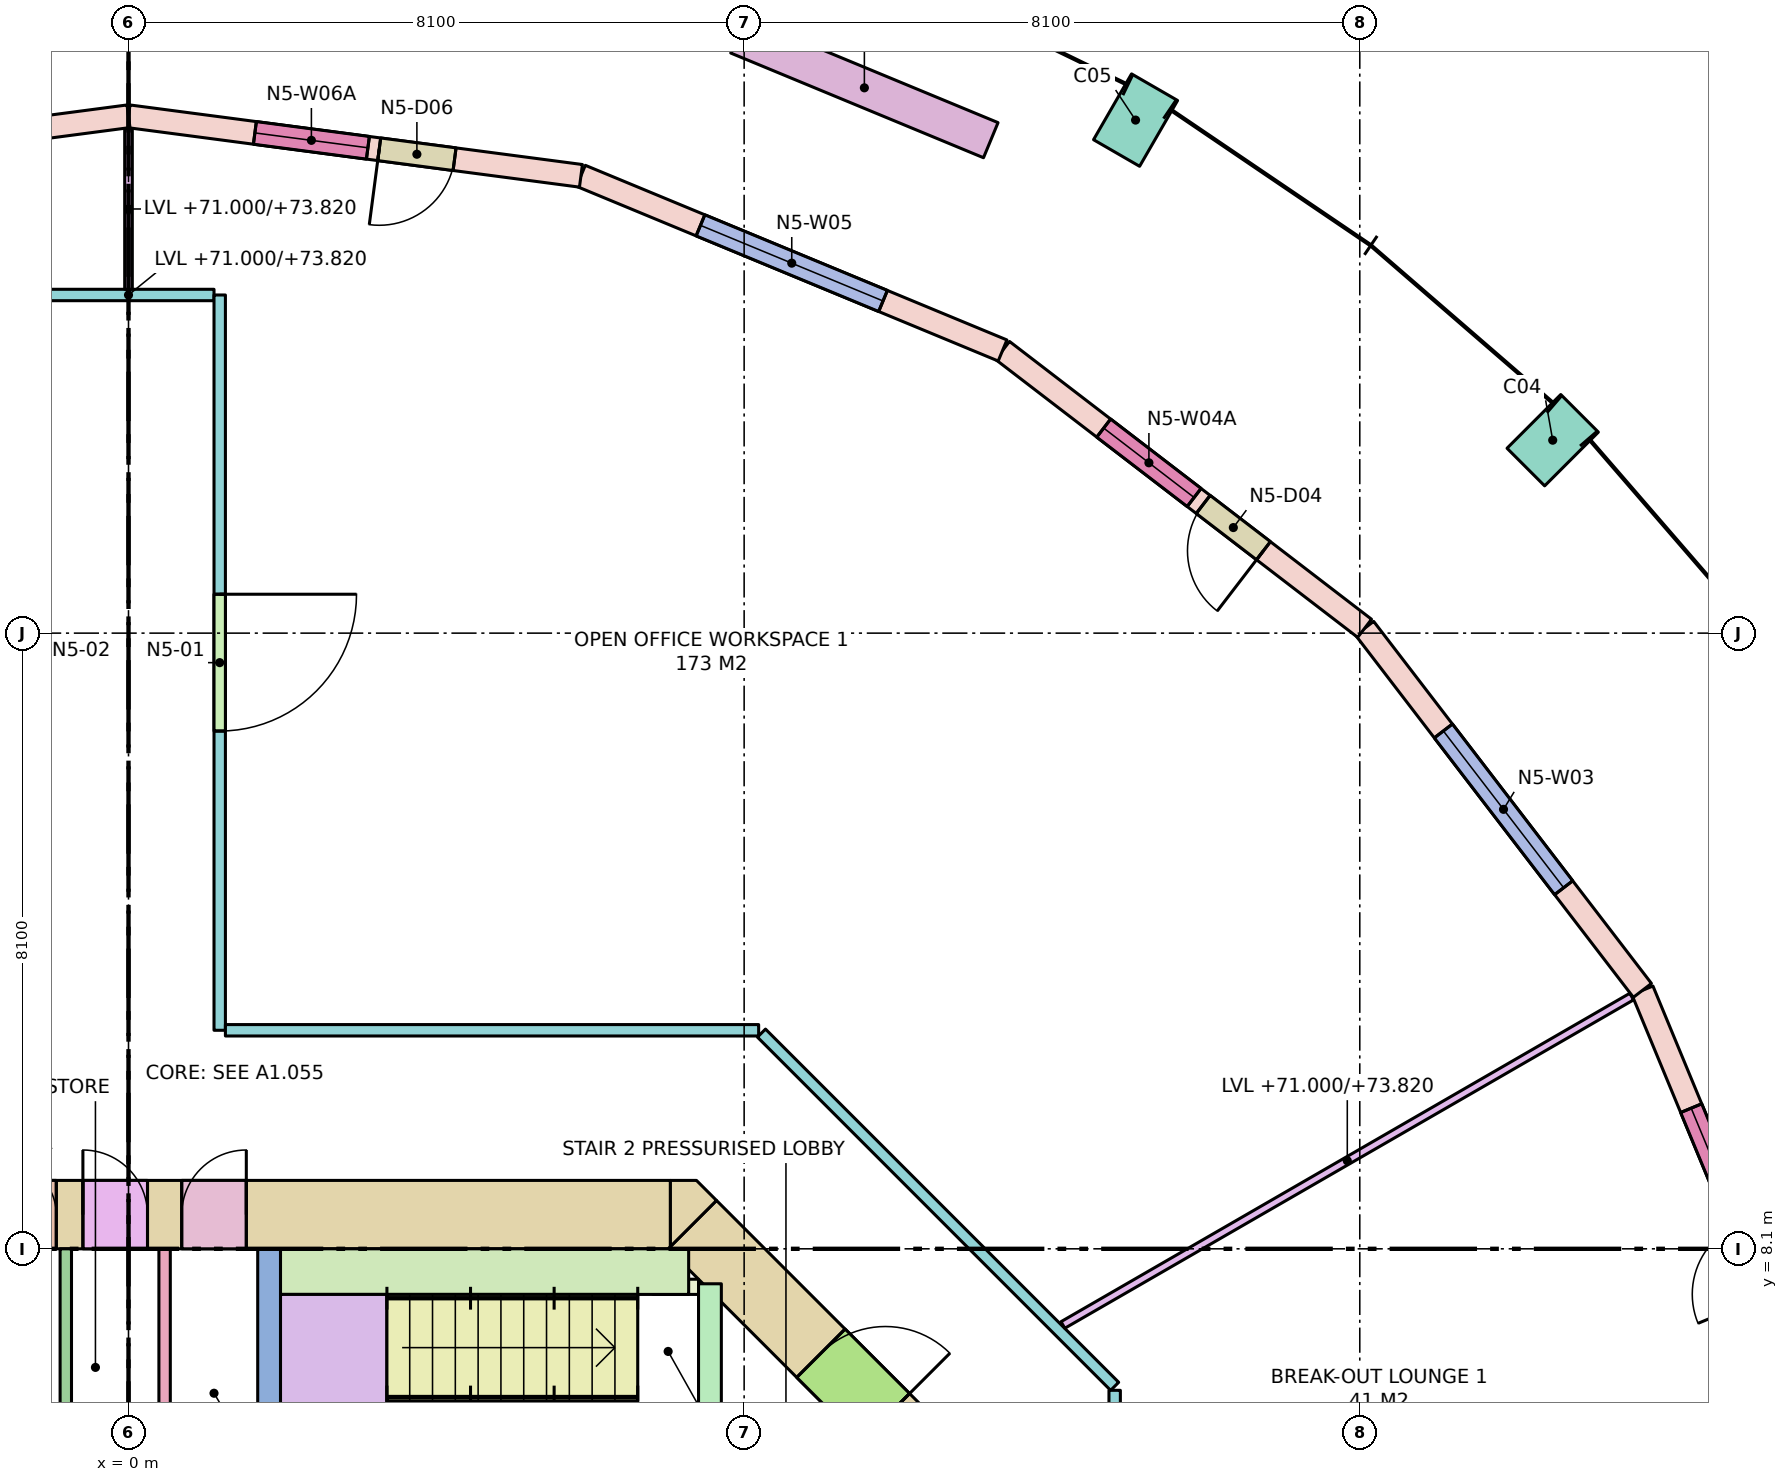
"""IFC4 building model, lengths in metres.
Left out: names, types, materials, properties, quantities, classifications, styles, units other than length and angle.
Written with IfcOpenShell. Run it as: python <this file> out.ifc"""

import sys

from ifc_helpers import new_model, si_unit, direction, frame, frame_2d, origin, origin_2d, place, context, subcontext, project, spatial, polyline, rectangle, outline, extrude, element, fill, save


model = new_model("IFC4")
c1 = context("Model", 3, precision=1e-05, world=origin(), true_north=direction((0.0, 1.0)))
c2 = subcontext(c1, "Body", "Model", "MODEL_VIEW")
j1 = project(units=[si_unit("LENGTHUNIT", "METRE"), si_unit("PLANEANGLEUNIT", "RADIAN")], contexts=[c1])
p1 = place(None, origin())
s1 = spatial("IfcSite", under=j1, at=p1, CompositionType="ELEMENT")
p2 = place(p1, origin())
s2 = spatial("IfcBuilding", under=s1, at=p2, CompositionType="ELEMENT")
p3 = place(p2, frame((0.0, 0.0, 71.0)))
s3 = spatial("IfcBuildingStorey", under=s2, at=p3, CompositionType="ELEMENT", Elevation=71.0)
for number, where, z_axis, x_axis in (
    (1, (18.738, 18.738, 0.0), (0.0, 0.0, 1.0), (-0.707, 0.707, 0.0)),
    (2, (13.25, 22.95, 0.0), (0.0, 0.0, 1.0), (-0.866, 0.5, 0.0)),
):
    element("IfcColumn", number, at=place(p3, frame(where, z_axis=z_axis, x_axis=x_axis)), inside=s3, PredefinedType="COLUMN", context=c2, shape_type="SweptSolid", body=[
        extrude(rectangle(XDim=0.7, YDim=1.0, at=origin_2d()), origin(), (0.0, 0.0, 1.0), 4.0),
    ])
p4 = place(p3, frame((-7.13, 8.55, -0.28), z_axis=(0.0, 0.0, 1.0), x_axis=(1.0, 0.0, 0.0)))
e3 = element("IfcWall", 3, at=p4, inside=s3, PredefinedType="SHEAR", context=c2, shape_type="SweptSolid", body=[
    extrude(rectangle(XDim=14.26, YDim=0.9, at=frame_2d((7.13, 0.0))), origin(), (0.0, 0.0, 1.0), 4.0),
])
p5 = place(p4, frame((5.48, 0.0, 0.28)))
e4 = element("IfcOpeningElement", 4, at=p5, cuts=e3, PredefinedType="OPENING", context=c2, shape_type="SweptSolid", body=[
    extrude(rectangle(XDim=0.7, YDim=2.1, at=frame_2d((0.35, 1.05))), frame((0.0, 0.46, 0.0), z_axis=(0.0, -1.0, 0.0), x_axis=(1.0, 0.0, 0.0)), (0.0, 0.0, 1.0), 0.92),
])
p6 = place(p4, frame((6.53, 0.0, 0.28)))
e5 = element("IfcOpeningElement", 5, at=p6, cuts=e3, PredefinedType="OPENING", context=c2, shape_type="SweptSolid", body=[
    extrude(rectangle(XDim=0.85, YDim=2.1, at=frame_2d((0.425, 1.05))), frame((0.0, 0.46, 0.0), z_axis=(0.0, -1.0, 0.0), x_axis=(1.0, 0.0, 0.0)), (0.0, 0.0, 1.0), 0.92),
])
p7 = place(p4, frame((7.83, 0.0, 0.28)))
e6 = element("IfcOpeningElement", 6, at=p7, cuts=e3, PredefinedType="OPENING", context=c2, shape_type="SweptSolid", body=[
    extrude(rectangle(XDim=0.85, YDim=2.1, at=frame_2d((0.425, 1.05))), frame((0.0, 0.46, 0.0), z_axis=(0.0, -1.0, 0.0), x_axis=(1.0, 0.0, 0.0)), (0.0, 0.0, 1.0), 0.92),
])
p8 = place(p3, frame((7.418, 8.418, -0.28), z_axis=(0.0, 0.0, 1.0), x_axis=(0.707106781187, -0.707106781187, 0.0)))
e7 = element("IfcWall", 7, at=p8, inside=s3, PredefinedType="SHEAR", context=c2, shape_type="SweptSolid", body=[
    extrude(rectangle(XDim=4.243, YDim=0.9, at=frame_2d((2.121, 0.0))), origin(), (0.0, 0.0, 1.0), 4.0),
])
p9 = place(p8, frame((2.393, 0.0, 0.28)))
e8 = element("IfcOpeningElement", 8, at=p9, cuts=e7, PredefinedType="OPENING", context=c2, shape_type="SweptSolid", body=[
    extrude(rectangle(XDim=1.2, YDim=2.1, at=frame_2d((0.6, 1.05))), frame((0.0, 0.46, 0.0), z_axis=(0.0, -1.0, 0.0), x_axis=(1.0, 0.0, 0.0)), (0.0, 0.0, 1.0), 0.92),
])
p10 = place(p3, frame((0.0, 0.0, -0.28)))
e9 = element("IfcWall", 9, at=p10, inside=s3, PredefinedType="SHEAR", context=c2, shape_type="SweptSolid", body=[
    extrude(outline(polyline([(7.473, 9.0), (7.736, 8.736), (7.13, 8.13), (7.13, 9.0), (7.473, 9.0)])), origin(), (0.0, 0.0, 1.0), 4.0),
])
p11 = place(p3, frame((1.85, 1.5, 0.0), z_axis=(0.0, 0.0, 1.0), x_axis=(0.0, 1.0, 0.0)))
e10 = element("IfcWall", 10, at=p11, inside=s3, PredefinedType="SHEAR", context=c2, shape_type="SweptSolid", body=[
    extrude(rectangle(XDim=6.6, YDim=0.3, at=frame_2d((3.3, 0.0))), origin(), (0.0, 0.0, 1.0), 3.72),
])
p12 = place(p3, frame((7.65, 4.5, 0.0), z_axis=(0.0, 0.0, 1.0), x_axis=(0.0, 1.0, 0.0)))
e11 = element("IfcWall", 11, at=p12, inside=s3, PredefinedType="SHEAR", context=c2, shape_type="SweptSolid", body=[
    extrude(rectangle(XDim=3.14, YDim=0.3, at=frame_2d((1.57, 0.0))), origin(), (0.0, 0.0, 1.0), 3.72),
])
p13 = place(p12, frame((0.14, 0.0, 0.0)))
e12 = element("IfcOpeningElement", 12, at=p13, cuts=e11, PredefinedType="OPENING", context=c2, shape_type="SweptSolid", body=[
    extrude(rectangle(XDim=1.32, YDim=2.1, at=frame_2d((0.66, 1.05))), frame((0.0, 0.16, 0.0), z_axis=(0.0, -1.0, 0.0), x_axis=(1.0, 0.0, 0.0)), (0.0, 0.0, 1.0), 0.32),
])
p14 = place(p3, frame((2.0, 7.8, 0.0), z_axis=(0.0, 0.0, 1.0), x_axis=(1.0, 0.0, 0.0)))
e13 = element("IfcWall", 13, at=p14, inside=s3, PredefinedType="SHEAR", context=c2, shape_type="SweptSolid", body=[
    extrude(rectangle(XDim=5.37, YDim=0.6, at=frame_2d((2.685, 0.0))), origin(), (0.0, 0.0, 1.0), 3.72),
])
p15 = place(p3, frame((6.9, 7.6, 0.0), z_axis=(0.0, 0.0, 1.0), x_axis=(1.0, 0.0, 0.0)))
e14 = element("IfcWall", 14, at=p15, inside=s3, PredefinedType="SHEAR", context=c2, shape_type="SweptSolid", body=[
    extrude(rectangle(XDim=0.6, YDim=0.2, at=frame_2d((0.3, 0.0))), origin(), (0.0, 0.0, 1.0), 3.72),
])
p16 = place(p3, frame((22.216, 5.953, 0.0), z_axis=(0.0, 0.0, 1.0), x_axis=(-0.382671411433, 0.923884511653, 0.0)))
e15 = element("IfcWall", 15, at=p16, inside=s3, PredefinedType="STANDARD", context=c2, shape_type="SweptSolid", body=[
    extrude(rectangle(XDim=6.004, YDim=0.3, at=frame_2d((3.002, 0.0))), origin(), (0.0, 0.0, 1.0), 3.72),
])
p17 = place(p16, frame((1.677, 0.0, 0.0)))
e16 = element("IfcOpeningElement", 16, at=p17, cuts=e15, PredefinedType="OPENING", context=c2, shape_type="SweptSolid", body=[
    extrude(rectangle(XDim=1.0, YDim=2.4, at=frame_2d((0.5, 1.2))), frame((0.0, 0.16, 0.0), z_axis=(0.0, -1.0, 0.0), x_axis=(1.0, 0.0, 0.0)), (0.0, 0.0, 1.0), 0.32),
])
p18 = place(p16, frame((2.827, 0.0, 0.8)))
e17 = element("IfcOpeningElement", 17, at=p18, cuts=e15, PredefinedType="OPENING", context=c2, shape_type="SweptSolid", body=[
    extrude(rectangle(XDim=1.5, YDim=2.7, at=frame_2d((0.75, 1.35))), frame((0.0, 0.16, 0.0), z_axis=(0.0, -1.0, 0.0), x_axis=(1.0, 0.0, 0.0)), (0.0, 0.0, 1.0), 0.32),
])
p19 = place(p3, frame((19.919, 11.5, 0.0), z_axis=(0.0, 0.0, 1.0), x_axis=(-0.608778912074, 0.793339924758, 0.0)))
e18 = element("IfcWall", 18, at=p19, inside=s3, PredefinedType="STANDARD", context=c2, shape_type="SweptSolid", body=[
    extrude(rectangle(XDim=6.004, YDim=0.3, at=frame_2d((3.002, 0.0))), origin(), (0.0, 0.0, 1.0), 3.72),
])
p20 = place(p19, frame((1.702, 0.0, 0.8)))
e19 = element("IfcOpeningElement", 19, at=p20, cuts=e18, PredefinedType="OPENING", context=c2, shape_type="SweptSolid", body=[
    extrude(rectangle(XDim=2.6, YDim=2.7, at=frame_2d((1.3, 1.35))), frame((0.0, 0.16, 0.0), z_axis=(0.0, -1.0, 0.0), x_axis=(1.0, 0.0, 0.0)), (0.0, 0.0, 1.0), 0.32),
])
p21 = place(p3, frame((16.263, 16.263, 0.0), z_axis=(0.0, 0.0, 1.0), x_axis=(-0.793339924758, 0.608778912074, 0.0)))
e20 = element("IfcWall", 20, at=p21, inside=s3, PredefinedType="STANDARD", context=c2, shape_type="SweptSolid", body=[
    extrude(rectangle(XDim=6.004, YDim=0.3, at=frame_2d((3.002, 0.0))), origin(), (0.0, 0.0, 1.0), 3.72),
])
p22 = place(p21, frame((1.677, 0.0, 0.0)))
e21 = element("IfcOpeningElement", 21, at=p22, cuts=e20, PredefinedType="OPENING", context=c2, shape_type="SweptSolid", body=[
    extrude(rectangle(XDim=1.0, YDim=2.4, at=frame_2d((0.5, 1.2))), frame((0.0, 0.16, 0.0), z_axis=(0.0, -1.0, 0.0), x_axis=(1.0, 0.0, 0.0)), (0.0, 0.0, 1.0), 0.32),
])
p23 = place(p21, frame((2.827, 0.0, 0.8)))
e22 = element("IfcOpeningElement", 22, at=p23, cuts=e20, PredefinedType="OPENING", context=c2, shape_type="SweptSolid", body=[
    extrude(rectangle(XDim=1.5, YDim=2.7, at=frame_2d((0.75, 1.35))), frame((0.0, 0.16, 0.0), z_axis=(0.0, -1.0, 0.0), x_axis=(1.0, 0.0, 0.0)), (0.0, 0.0, 1.0), 0.32),
])
p24 = place(p3, frame((11.5, 19.919, 0.0), z_axis=(0.0, 0.0, 1.0), x_axis=(-0.923884511653, 0.382671411433, 0.0)))
e23 = element("IfcWall", 23, at=p24, inside=s3, PredefinedType="STANDARD", context=c2, shape_type="SweptSolid", body=[
    extrude(rectangle(XDim=6.004, YDim=0.3, at=frame_2d((3.002, 0.0))), origin(), (0.0, 0.0, 1.0), 3.72),
])
p25 = place(p24, frame((1.702, 0.0, 0.8)))
e24 = element("IfcOpeningElement", 24, at=p25, cuts=e23, PredefinedType="OPENING", context=c2, shape_type="SweptSolid", body=[
    extrude(rectangle(XDim=2.6, YDim=2.7, at=frame_2d((1.3, 1.35))), frame((0.0, 0.16, 0.0), z_axis=(0.0, -1.0, 0.0), x_axis=(1.0, 0.0, 0.0)), (0.0, 0.0, 1.0), 0.32),
])
p26 = place(p3, frame((5.953, 22.216, 0.0), z_axis=(0.0, 0.0, 1.0), x_axis=(-0.991445297315, 0.130522880875, 0.0)))
e25 = element("IfcWall", 25, at=p26, inside=s3, PredefinedType="STANDARD", context=c2, shape_type="SweptSolid", body=[
    extrude(rectangle(XDim=6.004, YDim=0.3, at=frame_2d((3.002, 0.0))), origin(), (0.0, 0.0, 1.0), 3.72),
])
p27 = place(p26, frame((1.677, 0.0, 0.0)))
e26 = element("IfcOpeningElement", 26, at=p27, cuts=e25, PredefinedType="OPENING", context=c2, shape_type="SweptSolid", body=[
    extrude(rectangle(XDim=1.0, YDim=2.4, at=frame_2d((0.5, 1.2))), frame((0.0, 0.16, 0.0), z_axis=(0.0, -1.0, 0.0), x_axis=(1.0, 0.0, 0.0)), (0.0, 0.0, 1.0), 0.32),
])
p28 = place(p26, frame((2.827, 0.0, 0.8)))
e27 = element("IfcOpeningElement", 27, at=p28, cuts=e25, PredefinedType="OPENING", context=c2, shape_type="SweptSolid", body=[
    extrude(rectangle(XDim=1.5, YDim=2.7, at=frame_2d((0.75, 1.35))), frame((0.0, 0.16, 0.0), z_axis=(0.0, -1.0, 0.0), x_axis=(1.0, 0.0, 0.0)), (0.0, 0.0, 1.0), 0.32),
])
p29 = place(p3, frame((0.0, 23.0, 0.0), z_axis=(0.0, 0.0, 1.0), x_axis=(-0.991445297315, -0.130522880875, 0.0)))
e28 = element("IfcWall", 28, at=p29, inside=s3, PredefinedType="STANDARD", context=c2, shape_type="SweptSolid", body=[
    extrude(rectangle(XDim=6.004, YDim=0.3, at=frame_2d((3.002, 0.0))), origin(), (0.0, 0.0, 1.0), 3.72),
])
p30 = place(p29, frame((1.702, 0.0, 0.8)))
e29 = element("IfcOpeningElement", 29, at=p30, cuts=e28, PredefinedType="OPENING", context=c2, shape_type="SweptSolid", body=[
    extrude(rectangle(XDim=2.6, YDim=2.7, at=frame_2d((1.3, 1.35))), frame((0.0, 0.16, 0.0), z_axis=(0.0, -1.0, 0.0), x_axis=(1.0, 0.0, 0.0)), (0.0, 0.0, 1.0), 0.32),
])
p31 = place(p3, frame((11.345, 22.685, 0.0), z_axis=(0.0, 0.0, 1.0), x_axis=(-0.923885420167, 0.382669217998, 0.0)))
e30 = element("IfcWall", 30, at=p31, inside=s3, PredefinedType="PARAPET", context=c2, shape_type="SweptSolid", body=[
    extrude(rectangle(XDim=3.6, YDim=0.5, at=frame_2d((1.8, 0.0))), origin(), (0.0, 0.0, 1.0), 0.9),
])
for number, where, z_axis, x_axis in (
    (31, (-0.825, 5.1, 0.0), (0.0, 0.0, 1.0), (0.0, 1.0, 0.0)),
    (32, (0.475, 5.1, 0.0), (0.0, 0.0, 1.0), (0.0, 1.0, 0.0)),
):
    element("IfcWall", number, at=place(p3, frame(where, z_axis=z_axis, x_axis=x_axis)), inside=s3, PredefinedType="PARTITIONING", context=c2, shape_type="SweptSolid", body=[
        extrude(rectangle(XDim=3.0, YDim=0.15, at=frame_2d((1.5, 0.0))), origin(), (0.0, 0.0, 1.0), 3.72),
    ])
p32 = place(p3, frame((-1.125, 20.649, 0.0), z_axis=(0.0, 0.0, 1.0), x_axis=(1.0, 0.0, 0.0)))
e33 = element("IfcWall", 33, at=p32, inside=s3, PredefinedType="PARTITIONING", context=c2, shape_type="SweptSolid", body=[
    extrude(rectangle(XDim=2.25, YDim=0.15, at=frame_2d((1.125, 0.0))), origin(), (0.0, 0.0, 1.0), 2.82),
])
p33 = place(p3, frame((1.2, 20.649, 0.0), z_axis=(0.0, 0.0, 1.0), x_axis=(0.0, -1.0, 0.0)))
e34 = element("IfcWall", 34, at=p33, inside=s3, PredefinedType="PARTITIONING", context=c2, shape_type="SweptSolid", body=[
    extrude(rectangle(XDim=9.674, YDim=0.15, at=frame_2d((4.837, 0.0))), origin(), (0.0, 0.0, 1.0), 3.72),
])
p34 = place(p33, frame((3.937, 0.0, 0.0)))
e35 = element("IfcOpeningElement", 35, at=p34, cuts=e34, PredefinedType="OPENING", context=c2, shape_type="SweptSolid", body=[
    extrude(rectangle(XDim=1.8, YDim=2.1, at=frame_2d((0.9, 1.05))), frame((0.0, 0.085, 0.0), z_axis=(0.0, -1.0, 0.0), x_axis=(1.0, 0.0, 0.0)), (0.0, 0.0, 1.0), 0.17),
])
p35 = place(p3, frame((1.275, 10.975, 0.0), z_axis=(0.0, 0.0, 1.0), x_axis=(1.0, 0.0, 0.0)))
e36 = element("IfcWall", 36, at=p35, inside=s3, PredefinedType="PARTITIONING", context=c2, shape_type="SweptSolid", body=[
    extrude(rectangle(XDim=7.016, YDim=0.15, at=frame_2d((3.508, 0.0))), origin(), (0.0, 0.0, 1.0), 2.82),
])
p36 = place(p3, frame((8.328, 10.938, 0.0), z_axis=(0.0, 0.0, 1.0), x_axis=(0.707125355289, -0.707088206597, 0.0)))
e37 = element("IfcWall", 37, at=p36, inside=s3, PredefinedType="PARTITIONING", context=c2, shape_type="SweptSolid", body=[
    extrude(rectangle(XDim=6.572, YDim=0.15, at=frame_2d((3.286, 0.0))), origin(), (0.0, 0.0, 1.0), 2.82),
])
p37 = place(p3, frame((12.975, 6.238, 0.0), z_axis=(0.0, 0.0, 1.0), x_axis=(0.0, -1.0, 0.0)))
e38 = element("IfcWall", 38, at=p37, inside=s3, PredefinedType="PARTITIONING", context=c2, shape_type="SweptSolid", body=[
    extrude(rectangle(XDim=4.963, YDim=0.15, at=frame_2d((2.482, 0.0))), origin(), (0.0, 0.0, 1.0), 2.82),
])
p38 = place(p37, frame((0.456, 0.0, 0.0)))
e39 = element("IfcOpeningElement", 39, at=p38, cuts=e38, PredefinedType="OPENING", context=c2, shape_type="SweptSolid", body=[
    extrude(rectangle(XDim=1.8, YDim=2.1, at=frame_2d((0.9, 1.05))), frame((0.0, 0.085, 0.0), z_axis=(0.0, -1.0, 0.0), x_axis=(1.0, 0.0, 0.0)), (0.0, 0.0, 1.0), 0.17),
])
p39 = place(p3, frame((12.294, 7.098, 0.0), z_axis=(0.0, 0.0, 1.0), x_axis=(0.866010547425, 0.500025731086, 0.0)))
e40 = element("IfcWall", 40, at=p39, inside=s3, PredefinedType="PARTITIONING", context=c2, shape_type="SweptSolid", body=[
    extrude(rectangle(XDim=8.641, YDim=0.1, at=frame_2d((4.32, 0.0))), origin(), (0.0, 0.0, 1.0), 2.82),
])
p40 = place(p3, frame((0.0, 20.724, 0.0), z_axis=(0.0, 0.0, 1.0), x_axis=(0.0, 1.0, 0.0)))
e41 = element("IfcWall", 41, at=p40, inside=s3, PredefinedType="PARTITIONING", context=c2, shape_type="SweptSolid", body=[
    extrude(rectangle(XDim=2.113, YDim=0.1, at=frame_2d((1.057, 0.0))), origin(), (0.0, 0.0, 1.0), 2.82),
])
p41 = place(p18, origin())
e42 = element("IfcWindow", 42, at=p41, inside=s3, PartitioningType="SINGLE_PANEL", PredefinedType="WINDOW", context=c2, shape_type="SweptSolid", body=[
    extrude(rectangle(XDim=1.5, YDim=2.7, at=frame_2d((0.75, 1.35))), frame((0.0, 0.03, 0.0), z_axis=(0.0, -1.0, 0.0), x_axis=(1.0, 0.0, 0.0)), (0.0, 0.0, 1.0), 0.06),
])
fill(e17, e42)
p42 = place(p20, origin())
e43 = element("IfcWindow", 43, at=p42, inside=s3, PartitioningType="SINGLE_PANEL", PredefinedType="WINDOW", context=c2, shape_type="SweptSolid", body=[
    extrude(rectangle(XDim=2.6, YDim=2.7, at=frame_2d((1.3, 1.35))), frame((0.0, 0.03, 0.0), z_axis=(0.0, -1.0, 0.0), x_axis=(1.0, 0.0, 0.0)), (0.0, 0.0, 1.0), 0.06),
])
fill(e19, e43)
p43 = place(p22, origin())
e44 = element("IfcDoor", 44, at=p43, inside=s3, OperationType="SINGLE_SWING_LEFT", PredefinedType="DOOR", context=c2, shape_type="SweptSolid", body=[
    extrude(rectangle(XDim=1.0, YDim=2.4, at=frame_2d((0.5, 1.2))), frame((0.0, 0.025, 0.0), z_axis=(0.0, -1.0, 0.0), x_axis=(1.0, 0.0, 0.0)), (0.0, 0.0, 1.0), 0.05),
])
fill(e21, e44)
p44 = place(p23, origin())
e45 = element("IfcWindow", 45, at=p44, inside=s3, PartitioningType="SINGLE_PANEL", PredefinedType="WINDOW", context=c2, shape_type="SweptSolid", body=[
    extrude(rectangle(XDim=1.5, YDim=2.7, at=frame_2d((0.75, 1.35))), frame((0.0, 0.03, 0.0), z_axis=(0.0, -1.0, 0.0), x_axis=(1.0, 0.0, 0.0)), (0.0, 0.0, 1.0), 0.06),
])
fill(e22, e45)
p45 = place(p25, origin())
e46 = element("IfcWindow", 46, at=p45, inside=s3, PartitioningType="SINGLE_PANEL", PredefinedType="WINDOW", context=c2, shape_type="SweptSolid", body=[
    extrude(rectangle(XDim=2.6, YDim=2.7, at=frame_2d((1.3, 1.35))), frame((0.0, 0.03, 0.0), z_axis=(0.0, -1.0, 0.0), x_axis=(1.0, 0.0, 0.0)), (0.0, 0.0, 1.0), 0.06),
])
fill(e24, e46)
p46 = place(p27, origin())
e47 = element("IfcDoor", 47, at=p46, inside=s3, OperationType="SINGLE_SWING_RIGHT", PredefinedType="DOOR", context=c2, shape_type="SweptSolid", body=[
    extrude(rectangle(XDim=1.0, YDim=2.4, at=frame_2d((0.5, 1.2))), frame((0.0, 0.025, 0.0), z_axis=(0.0, -1.0, 0.0), x_axis=(1.0, 0.0, 0.0)), (0.0, 0.0, 1.0), 0.05),
])
fill(e26, e47)
p47 = place(p28, origin())
e48 = element("IfcWindow", 48, at=p47, inside=s3, PartitioningType="SINGLE_PANEL", PredefinedType="WINDOW", context=c2, shape_type="SweptSolid", body=[
    extrude(rectangle(XDim=1.5, YDim=2.7, at=frame_2d((0.75, 1.35))), frame((0.0, 0.03, 0.0), z_axis=(0.0, -1.0, 0.0), x_axis=(1.0, 0.0, 0.0)), (0.0, 0.0, 1.0), 0.06),
])
fill(e27, e48)
p48 = place(p9, origin())
e49 = element("IfcDoor", 49, at=p48, inside=s3, OperationType="SINGLE_SWING_RIGHT", PredefinedType="DOOR", context=c2, shape_type="SweptSolid", body=[
    extrude(rectangle(XDim=1.2, YDim=2.1, at=frame_2d((0.6, 1.05))), frame((0.0, 0.025, 0.0), z_axis=(0.0, -1.0, 0.0), x_axis=(1.0, 0.0, 0.0)), (0.0, 0.0, 1.0), 0.05),
])
fill(e8, e49)
p49 = place(p5, origin())
e50 = element("IfcDoor", 50, at=p49, inside=s3, OperationType="SINGLE_SWING_LEFT", PredefinedType="DOOR", context=c2, shape_type="SweptSolid", body=[
    extrude(rectangle(XDim=0.7, YDim=2.1, at=frame_2d((0.35, 1.05))), frame((0.0, 0.025, 0.0), z_axis=(0.0, -1.0, 0.0), x_axis=(1.0, 0.0, 0.0)), (0.0, 0.0, 1.0), 0.05),
])
fill(e4, e50)
p50 = place(p6, origin())
e51 = element("IfcDoor", 51, at=p50, inside=s3, OperationType="SINGLE_SWING_LEFT", PredefinedType="DOOR", context=c2, shape_type="SweptSolid", body=[
    extrude(rectangle(XDim=0.85, YDim=2.1, at=frame_2d((0.425, 1.05))), frame((0.0, 0.025, 0.0), z_axis=(0.0, -1.0, 0.0), x_axis=(1.0, 0.0, 0.0)), (0.0, 0.0, 1.0), 0.05),
])
fill(e5, e51)
p51 = place(p7, origin())
e52 = element("IfcDoor", 52, at=p51, inside=s3, OperationType="SINGLE_SWING_RIGHT", PredefinedType="DOOR", context=c2, shape_type="SweptSolid", body=[
    extrude(rectangle(XDim=0.85, YDim=2.1, at=frame_2d((0.425, 1.05))), frame((0.0, 0.025, 0.0), z_axis=(0.0, -1.0, 0.0), x_axis=(1.0, 0.0, 0.0)), (0.0, 0.0, 1.0), 0.05),
])
fill(e6, e52)
p52 = place(p34, origin())
e53 = element("IfcDoor", 53, at=p52, inside=s3, OperationType="DOUBLE_DOOR_SINGLE_SWING", PredefinedType="DOOR", context=c2, shape_type="SweptSolid", body=[
    extrude(rectangle(XDim=1.8, YDim=2.1, at=frame_2d((0.9, 1.05))), frame((0.0, 0.025, 0.0), z_axis=(0.0, -1.0, 0.0), x_axis=(1.0, 0.0, 0.0)), (0.0, 0.0, 1.0), 0.05),
])
fill(e35, e53)
save(model, sys.argv[1])
